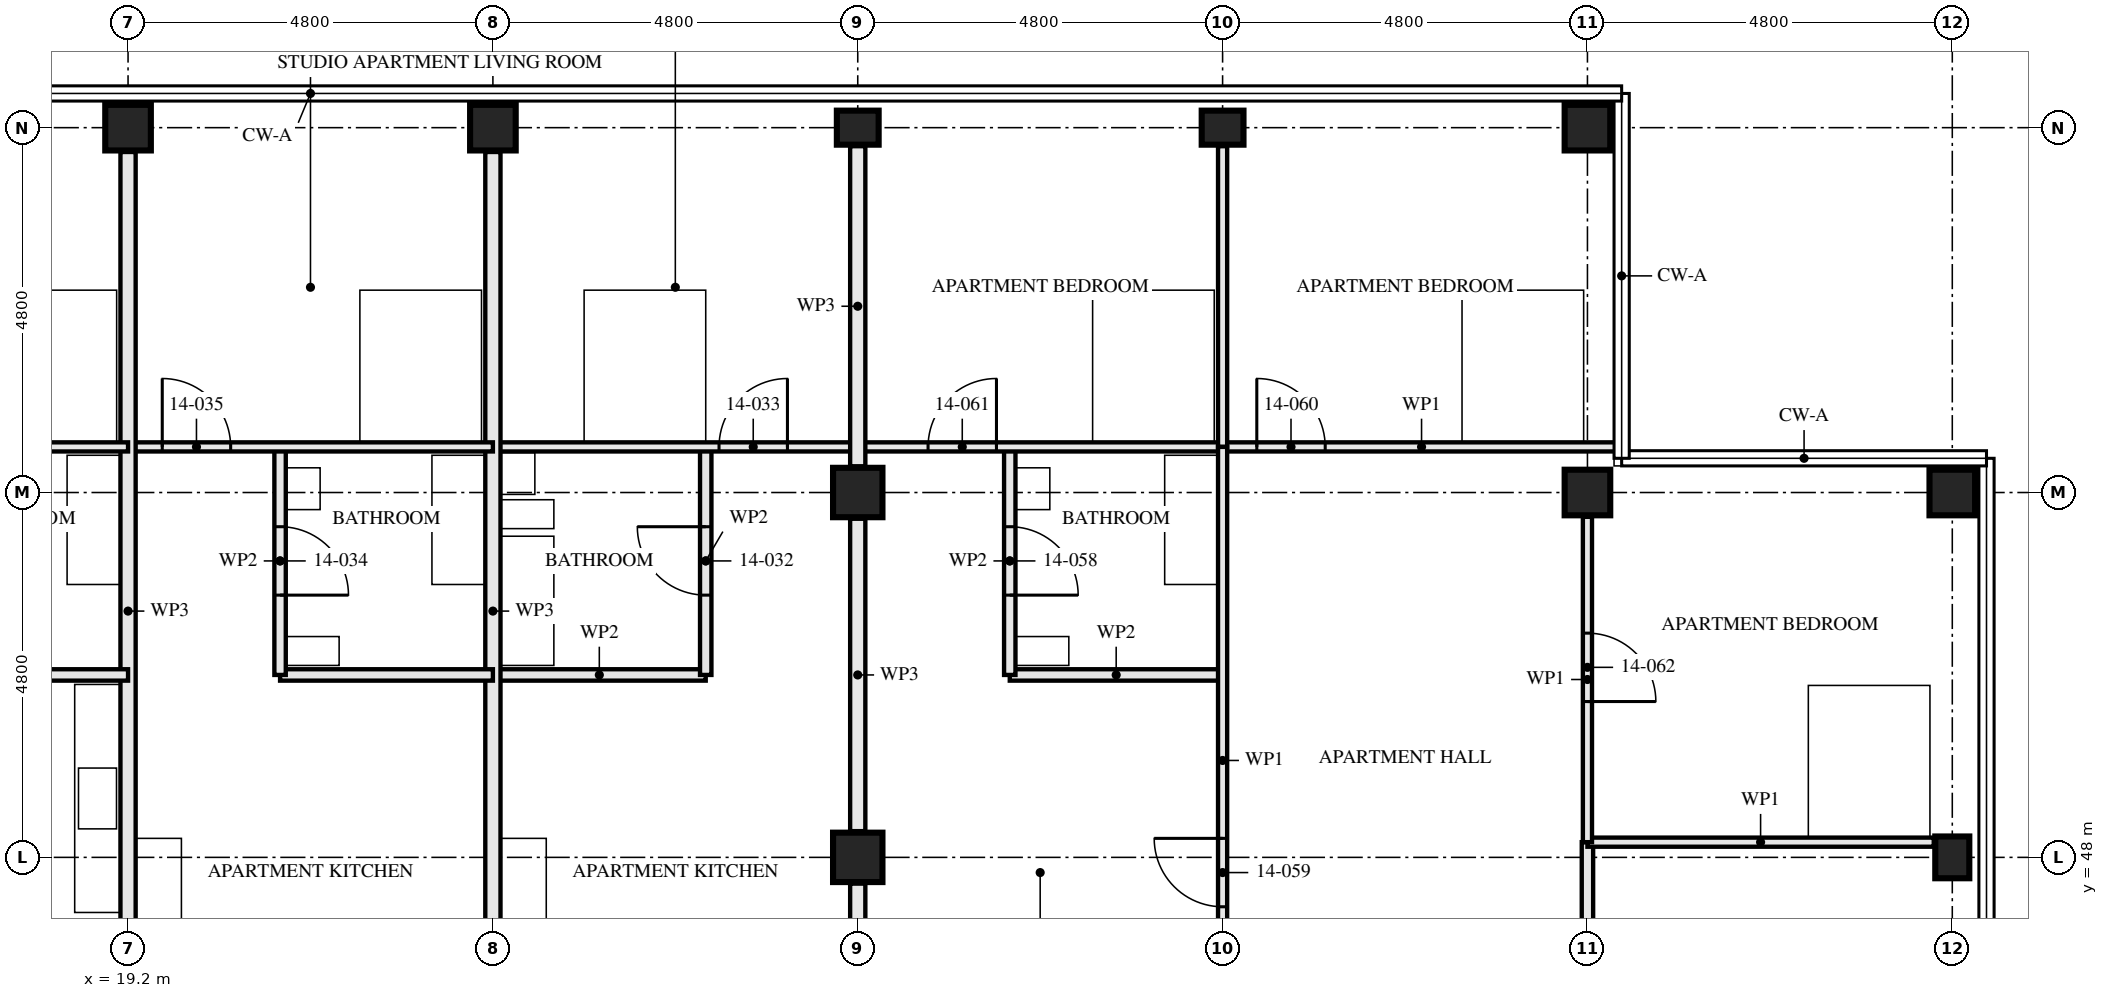
"""IFC4 building model, lengths in metres.
Left out: names, types, materials, properties, quantities, classifications, styles, units other than length and angle.
Written with IfcOpenShell. Run it as: python <this file> out.ifc"""

import sys

from ifc_helpers import new_model, si_unit, direction, frame, frame_2d, origin, origin_2d, place, context, subcontext, project, spatial, rectangle, hollow_rectangle, i_section, extrude, element, fill, save


model = new_model("IFC4")
c1 = context("Model", 3, precision=1e-05, world=origin(), true_north=direction((0.0, 1.0)))
c2 = subcontext(c1, "Body", "Model", "MODEL_VIEW")
j1 = project(units=[si_unit("LENGTHUNIT", "METRE"), si_unit("PLANEANGLEUNIT", "RADIAN")], contexts=[c1])
p1 = place(None, origin())
s1 = spatial("IfcSite", under=j1, at=p1, CompositionType="ELEMENT")
p2 = place(p1, origin())
s2 = spatial("IfcBuilding", under=s1, at=p2, CompositionType="ELEMENT")
p3 = place(p2, frame((0.0, 0.0, 55.0)))
s3 = spatial("IfcBuildingStorey", under=s2, at=p3, CompositionType="ELEMENT", Elevation=55.0)
for number, where, z_axis, x_axis in (
    (1, (19.2, 57.6, 0.0), (0.0, 0.0, 1.0), (0.0, 1.0, 0.0)),
    (2, (24.0, 57.6, 0.0), (0.0, 0.0, 1.0), (0.0, 1.0, 0.0)),
):
    element("IfcColumn", number, at=place(p3, frame(where, z_axis=z_axis, x_axis=x_axis)), inside=s3, PredefinedType="COLUMN", context=c2, shape_type="SweptSolid", body=[
        extrude(hollow_rectangle(XDim=0.6, YDim=0.6, WallThickness=0.08, at=origin_2d()), origin(), (0.0, 0.0, 1.0), 3.5),
    ])
for number, where, z_axis, x_axis in (
    (3, (28.8, 48.0, 0.0), (0.0, 0.0, 1.0), (1.0, 0.0, 0.0)),
    (4, (28.8, 52.8, 0.0), (0.0, 0.0, 1.0), (1.0, 0.0, 0.0)),
):
    element("IfcColumn", number, at=place(p3, frame(where, z_axis=z_axis, x_axis=x_axis)), inside=s3, PredefinedType="COLUMN", context=c2, shape_type="SweptSolid", body=[
        extrude(hollow_rectangle(XDim=0.65, YDim=0.65, WallThickness=0.05, at=origin_2d()), origin(), (0.0, 0.0, 1.0), 3.5),
    ])
for number, where, z_axis, x_axis in (
    (5, (28.8, 57.6, 0.0), (0.0, 0.0, 1.0), (0.0, 1.0, 0.0)),
    (6, (33.6, 57.6, 0.0), (0.0, 0.0, 1.0), (0.0, 1.0, 0.0)),
):
    element("IfcColumn", number, at=place(p3, frame(where, z_axis=z_axis, x_axis=x_axis)), inside=s3, PredefinedType="COLUMN", context=c2, shape_type="SweptSolid", body=[
        extrude(i_section(OverallWidth=0.448, OverallDepth=0.55, WebThickness=0.072, FlangeThickness=0.115, FilletRadius=0.015, at=origin_2d()), origin(), (0.0, 0.0, 1.0), 3.5),
    ])
for number, where, z_axis, x_axis in (
    (7, (38.4, 52.8, 0.0), (0.0, 0.0, 1.0), (0.0, 1.0, 0.0)),
    (8, (38.4, 57.6, 0.0), (0.0, 0.0, 1.0), (0.0, 1.0, 0.0)),
):
    element("IfcColumn", number, at=place(p3, frame(where, z_axis=z_axis, x_axis=x_axis)), inside=s3, PredefinedType="COLUMN", context=c2, shape_type="SweptSolid", body=[
        extrude(hollow_rectangle(XDim=0.6, YDim=0.6, WallThickness=0.05, at=origin_2d()), origin(), (0.0, 0.0, 1.0), 3.5),
    ])
p4 = place(p3, frame((43.2, 48.0, 0.0), z_axis=(0.0, 0.0, 1.0), x_axis=(1.0, 0.0, 0.0)))
e9 = element("IfcColumn", 9, at=p4, inside=s3, PredefinedType="COLUMN", context=c2, shape_type="SweptSolid", body=[
    extrude(i_section(OverallWidth=0.448, OverallDepth=0.55, WebThickness=0.072, FlangeThickness=0.115, FilletRadius=0.015, at=origin_2d()), origin(), (0.0, 0.0, 1.0), 3.5),
])
p5 = place(p3, frame((43.2, 52.8, 0.0), z_axis=(0.0, 0.0, 1.0), x_axis=(0.0, 1.0, 0.0)))
e10 = element("IfcColumn", 10, at=p5, inside=s3, PredefinedType="COLUMN", context=c2, shape_type="SweptSolid", body=[
    extrude(hollow_rectangle(XDim=0.6, YDim=0.6, WallThickness=0.05, at=origin_2d()), origin(), (0.0, 0.0, 1.0), 3.5),
])
p6 = place(p3, frame((26.8, 53.4, 0.0), z_axis=(0.0, 0.0, 1.0), x_axis=(0.0, -1.0, 0.0)))
e11 = element("IfcWall", 11, at=p6, inside=s3, PredefinedType="PARTITIONING", context=c2, shape_type="SweptSolid", body=[
    extrude(rectangle(XDim=3.0, YDim=0.15, at=frame_2d((1.5, 0.0))), origin(), (0.0, 0.0, 1.0), 2.55),
])
p7 = place(p6, frame((1.05, 0.0, 0.0)))
e12 = element("IfcOpeningElement", 12, at=p7, cuts=e11, PredefinedType="OPENING", context=c2, shape_type="SweptSolid", body=[
    extrude(rectangle(XDim=0.9, YDim=2.1, at=frame_2d((0.45, 1.05))), frame((0.0, 0.085, 0.0), z_axis=(0.0, -1.0, 0.0), x_axis=(1.0, 0.0, 0.0)), (0.0, 0.0, 1.0), 0.171),
])
p8 = place(p3, frame((26.8, 50.4, 0.0), z_axis=(0.0, 0.0, 1.0), x_axis=(-1.0, 0.0, 0.0)))
e13 = element("IfcWall", 13, at=p8, inside=s3, PredefinedType="PARTITIONING", context=c2, shape_type="SweptSolid", body=[
    extrude(rectangle(XDim=2.8, YDim=0.15, at=frame_2d((1.4, 0.0))), origin(), (0.0, 0.0, 1.0), 3.33),
])
p9 = place(p3, frame((28.8, 53.4, 0.0), z_axis=(0.0, 0.0, 1.0), x_axis=(-1.0, 0.0, 0.0)))
e14 = element("IfcWall", 14, at=p9, inside=s3, PredefinedType="PARTITIONING", context=c2, shape_type="SweptSolid", body=[
    extrude(rectangle(XDim=4.8, YDim=0.12, at=frame_2d((2.4, 0.0))), origin(), (0.0, 0.0, 1.0), 3.33),
])
p10 = place(p9, frame((0.925, 0.0, 0.0)))
e15 = element("IfcOpeningElement", 15, at=p10, cuts=e14, PredefinedType="OPENING", context=c2, shape_type="SweptSolid", body=[
    extrude(rectangle(XDim=0.9, YDim=2.1, at=frame_2d((0.45, 1.05))), frame((0.0, 0.071, 0.0), z_axis=(0.0, -1.0, 0.0), x_axis=(1.0, 0.0, 0.0)), (0.0, 0.0, 1.0), 0.141),
])
p11 = place(p3, frame((24.0, 57.28, 0.0), z_axis=(0.0, 0.0, 1.0), x_axis=(0.0, -1.0, 0.0)))
e16 = element("IfcWall", 16, at=p11, inside=s3, PredefinedType="PARTITIONING", context=c2, shape_type="SweptSolid", body=[
    extrude(rectangle(XDim=12.08, YDim=0.2, at=frame_2d((6.04, 0.0))), origin(), (0.0, 0.0, 1.0), 2.55),
])
p12 = place(p3, frame((21.2, 53.4, 0.0), z_axis=(0.0, 0.0, 1.0), x_axis=(0.0, -1.0, 0.0)))
e17 = element("IfcWall", 17, at=p12, inside=s3, PredefinedType="PARTITIONING", context=c2, shape_type="SweptSolid", body=[
    extrude(rectangle(XDim=3.0, YDim=0.15, at=frame_2d((1.5, 0.0))), origin(), (0.0, 0.0, 1.0), 2.55),
])
p13 = place(p12, frame((1.05, 0.0, 0.0)))
e18 = element("IfcOpeningElement", 18, at=p13, cuts=e17, PredefinedType="OPENING", context=c2, shape_type="SweptSolid", body=[
    extrude(rectangle(XDim=0.9, YDim=2.1, at=frame_2d((0.45, 1.05))), frame((0.0, 0.085, 0.0), z_axis=(0.0, -1.0, 0.0), x_axis=(1.0, 0.0, 0.0)), (0.0, 0.0, 1.0), 0.171),
])
p14 = place(p3, frame((24.0, 50.4, 0.0), z_axis=(0.0, 0.0, 1.0), x_axis=(-1.0, 0.0, 0.0)))
e19 = element("IfcWall", 19, at=p14, inside=s3, PredefinedType="PARTITIONING", context=c2, shape_type="SweptSolid", body=[
    extrude(rectangle(XDim=2.8, YDim=0.15, at=frame_2d((1.4, 0.0))), origin(), (0.0, 0.0, 1.0), 3.33),
])
p15 = place(p3, frame((24.0, 53.4, 0.0), z_axis=(0.0, 0.0, 1.0), x_axis=(-1.0, 0.0, 0.0)))
e20 = element("IfcWall", 20, at=p15, inside=s3, PredefinedType="PARTITIONING", context=c2, shape_type="SweptSolid", body=[
    extrude(rectangle(XDim=4.8, YDim=0.12, at=frame_2d((2.4, 0.0))), origin(), (0.0, 0.0, 1.0), 3.33),
])
p16 = place(p15, frame((3.45, 0.0, 0.0)))
e21 = element("IfcOpeningElement", 21, at=p16, cuts=e20, PredefinedType="OPENING", context=c2, shape_type="SweptSolid", body=[
    extrude(rectangle(XDim=0.9, YDim=2.1, at=frame_2d((0.45, 1.05))), frame((0.0, 0.071, 0.0), z_axis=(0.0, -1.0, 0.0), x_axis=(1.0, 0.0, 0.0)), (0.0, 0.0, 1.0), 0.141),
])
p17 = place(p3, frame((19.2, 57.28, 0.0), z_axis=(0.0, 0.0, 1.0), x_axis=(0.0, -1.0, 0.0)))
e22 = element("IfcWall", 22, at=p17, inside=s3, PredefinedType="PARTITIONING", context=c2, shape_type="SweptSolid", body=[
    extrude(rectangle(XDim=12.08, YDim=0.2, at=frame_2d((6.04, 0.0))), origin(), (0.0, 0.0, 1.0), 2.55),
])
p18 = place(p3, frame((19.2, 50.4, 0.0), z_axis=(0.0, 0.0, 1.0), x_axis=(-1.0, 0.0, 0.0)))
e23 = element("IfcWall", 23, at=p18, inside=s3, PredefinedType="PARTITIONING", context=c2, shape_type="SweptSolid", body=[
    extrude(rectangle(XDim=2.8, YDim=0.15, at=frame_2d((1.4, 0.0))), origin(), (0.0, 0.0, 1.0), 3.33),
])
p19 = place(p3, frame((19.2, 53.4, 0.0), z_axis=(0.0, 0.0, 1.0), x_axis=(-1.0, 0.0, 0.0)))
e24 = element("IfcWall", 24, at=p19, inside=s3, PredefinedType="PARTITIONING", context=c2, shape_type="SweptSolid", body=[
    extrude(rectangle(XDim=4.8, YDim=0.12, at=frame_2d((2.4, 0.0))), origin(), (0.0, 0.0, 1.0), 3.33),
])
p20 = place(p19, frame((2.975, 0.0, 0.0)))
e25 = element("IfcOpeningElement", 25, at=p20, cuts=e24, PredefinedType="OPENING", context=c2, shape_type="SweptSolid", body=[
    extrude(rectangle(XDim=0.9, YDim=2.1, at=frame_2d((0.45, 1.05))), frame((0.0, 0.071, 0.0), z_axis=(0.0, -1.0, 0.0), x_axis=(1.0, 0.0, 0.0)), (0.0, 0.0, 1.0), 0.141),
])
p21 = place(p3, frame((38.4, 48.2, 0.0), z_axis=(0.0, 0.0, 1.0), x_axis=(0.0, -1.0, 0.0)))
e26 = element("IfcWall", 26, at=p21, inside=s3, PredefinedType="PARTITIONING", context=c2, shape_type="SweptSolid", body=[
    extrude(rectangle(XDim=3.0, YDim=0.15, at=frame_2d((1.5, 0.0))), origin(), (0.0, 0.0, 1.0), 2.55),
])
p22 = place(p21, frame((1.05, 0.0, 0.0)))
e27 = element("IfcOpeningElement", 27, at=p22, cuts=e26, PredefinedType="OPENING", context=c2, shape_type="SweptSolid", body=[
    extrude(rectangle(XDim=0.9, YDim=2.1, at=frame_2d((0.45, 1.05))), frame((0.0, 0.085, 0.0), z_axis=(0.0, -1.0, 0.0), x_axis=(1.0, 0.0, 0.0)), (0.0, 0.0, 1.0), 0.171),
])
p23 = place(p3, frame((30.8, 53.4, 0.0), z_axis=(0.0, 0.0, 1.0), x_axis=(0.0, -1.0, 0.0)))
e28 = element("IfcWall", 28, at=p23, inside=s3, PredefinedType="PARTITIONING", context=c2, shape_type="SweptSolid", body=[
    extrude(rectangle(XDim=3.0, YDim=0.15, at=frame_2d((1.5, 0.0))), origin(), (0.0, 0.0, 1.0), 2.55),
])
p24 = place(p23, frame((1.05, 0.0, 0.0)))
e29 = element("IfcOpeningElement", 29, at=p24, cuts=e28, PredefinedType="OPENING", context=c2, shape_type="SweptSolid", body=[
    extrude(rectangle(XDim=0.9, YDim=2.1, at=frame_2d((0.45, 1.05))), frame((0.0, 0.085, 0.0), z_axis=(0.0, -1.0, 0.0), x_axis=(1.0, 0.0, 0.0)), (0.0, 0.0, 1.0), 0.171),
])
p25 = place(p3, frame((33.6, 50.4, 0.0), z_axis=(0.0, 0.0, 1.0), x_axis=(-1.0, 0.0, 0.0)))
e30 = element("IfcWall", 30, at=p25, inside=s3, PredefinedType="PARTITIONING", context=c2, shape_type="SweptSolid", body=[
    extrude(rectangle(XDim=2.8, YDim=0.15, at=frame_2d((1.4, 0.0))), origin(), (0.0, 0.0, 1.0), 3.33),
])
p26 = place(p3, frame((33.6, 53.4, 0.0), z_axis=(0.0, 0.0, 1.0), x_axis=(0.0, -1.0, 0.0)))
e31 = element("IfcWall", 31, at=p26, inside=s3, PredefinedType="PARTITIONING", context=c2, shape_type="SweptSolid", body=[
    extrude(rectangle(XDim=8.25, YDim=0.12, at=frame_2d((4.125, 0.0))), origin(), (0.0, 0.0, 1.0), 2.55),
])
p27 = place(p26, frame((5.15, 0.0, 0.0)))
e32 = element("IfcOpeningElement", 32, at=p27, cuts=e31, PredefinedType="OPENING", context=c2, shape_type="SweptSolid", body=[
    extrude(rectangle(XDim=0.9, YDim=2.1, at=frame_2d((0.45, 1.05))), frame((0.0, 0.071, 0.0), z_axis=(0.0, -1.0, 0.0), x_axis=(1.0, 0.0, 0.0)), (0.0, 0.0, 1.0), 0.141),
])
p28 = place(p3, frame((42.956, 48.2, 0.0), z_axis=(0.0, 0.0, 1.0), x_axis=(-1.0, 0.0, 0.0)))
e33 = element("IfcWall", 33, at=p28, inside=s3, PredefinedType="PARTITIONING", context=c2, shape_type="SweptSolid", body=[
    extrude(rectangle(XDim=4.556, YDim=0.12, at=frame_2d((2.278, 0.0))), origin(), (0.0, 0.0, 1.0), 3.33),
])
p29 = place(p3, frame((38.835, 53.4, 0.0), z_axis=(0.0, 0.0, 1.0), x_axis=(-1.0, 0.0, 0.0)))
e34 = element("IfcWall", 34, at=p29, inside=s3, PredefinedType="PARTITIONING", context=c2, shape_type="SweptSolid", body=[
    extrude(rectangle(XDim=5.235, YDim=0.12, at=frame_2d((2.617, 0.0))), origin(), (0.0, 0.0, 1.0), 2.32),
])
p30 = place(p29, frame((3.885, 0.0, 0.0)))
e35 = element("IfcOpeningElement", 35, at=p30, cuts=e34, PredefinedType="OPENING", context=c2, shape_type="SweptSolid", body=[
    extrude(rectangle(XDim=0.9, YDim=2.1, at=frame_2d((0.45, 1.05))), frame((0.0, 0.071, 0.0), z_axis=(0.0, -1.0, 0.0), x_axis=(1.0, 0.0, 0.0)), (0.0, 0.0, 1.0), 0.141),
])
p31 = place(p3, frame((33.6, 53.4, 0.0), z_axis=(0.0, 0.0, 1.0), x_axis=(-1.0, 0.0, 0.0)))
e36 = element("IfcWall", 36, at=p31, inside=s3, PredefinedType="PARTITIONING", context=c2, shape_type="SweptSolid", body=[
    extrude(rectangle(XDim=4.8, YDim=0.12, at=frame_2d((2.4, 0.0))), origin(), (0.0, 0.0, 1.0), 3.33),
])
p32 = place(p31, frame((2.975, 0.0, 0.0)))
e37 = element("IfcOpeningElement", 37, at=p32, cuts=e36, PredefinedType="OPENING", context=c2, shape_type="SweptSolid", body=[
    extrude(rectangle(XDim=0.9, YDim=2.1, at=frame_2d((0.45, 1.05))), frame((0.0, 0.071, 0.0), z_axis=(0.0, -1.0, 0.0), x_axis=(1.0, 0.0, 0.0)), (0.0, 0.0, 1.0), 0.141),
])
p33 = place(p3, frame((38.4, 52.48, 0.0), z_axis=(0.0, 0.0, 1.0), x_axis=(0.0, -1.0, 0.0)))
e38 = element("IfcWall", 38, at=p33, inside=s3, PredefinedType="PARTITIONING", context=c2, shape_type="SweptSolid", body=[
    extrude(rectangle(XDim=4.28, YDim=0.12, at=frame_2d((2.14, 0.0))), origin(), (0.0, 0.0, 1.0), 3.33),
])
p34 = place(p33, frame((1.53, 0.0, 0.0)))
e39 = element("IfcOpeningElement", 39, at=p34, cuts=e38, PredefinedType="OPENING", context=c2, shape_type="SweptSolid", body=[
    extrude(rectangle(XDim=0.9, YDim=2.1, at=frame_2d((0.45, 1.05))), frame((0.0, 0.071, 0.0), z_axis=(0.0, -1.0, 0.0), x_axis=(1.0, 0.0, 0.0)), (0.0, 0.0, 1.0), 0.141),
])
p35 = place(p3, frame((33.6, 57.356, 0.0), z_axis=(0.0, 0.0, 1.0), x_axis=(0.0, -1.0, 0.0)))
e40 = element("IfcWall", 40, at=p35, inside=s3, PredefinedType="PARTITIONING", context=c2, shape_type="SweptSolid", body=[
    extrude(rectangle(XDim=3.956, YDim=0.12, at=frame_2d((1.978, 0.0))), origin(), (0.0, 0.0, 1.0), 3.33),
])
p36 = place(p3, frame((28.8, 45.1, 0.0), z_axis=(0.0, 0.0, 1.0), x_axis=(0.0, 1.0, 0.0)))
e41 = element("IfcWall", 41, at=p36, inside=s3, PredefinedType="PARTITIONING", context=c2, shape_type="SweptSolid", body=[
    extrude(rectangle(XDim=2.555, YDim=0.2, at=frame_2d((1.277, 0.0))), origin(), (0.0, 0.0, 1.0), 2.32),
])
p37 = place(p3, frame((28.8, 48.345, 0.0), z_axis=(0.0, 0.0, 1.0), x_axis=(0.0, 1.0, 0.0)))
e42 = element("IfcWall", 42, at=p37, inside=s3, PredefinedType="PARTITIONING", context=c2, shape_type="SweptSolid", body=[
    extrude(rectangle(XDim=4.11, YDim=0.2, at=frame_2d((2.055, 0.0))), origin(), (0.0, 0.0, 1.0), 2.32),
])
p38 = place(p3, frame((28.8, 53.145, 0.0), z_axis=(0.0, 0.0, 1.0), x_axis=(0.0, 1.0, 0.0)))
e43 = element("IfcWall", 43, at=p38, inside=s3, PredefinedType="PARTITIONING", context=c2, shape_type="SweptSolid", body=[
    extrude(rectangle(XDim=4.211, YDim=0.2, at=frame_2d((2.105, 0.0))), origin(), (0.0, 0.0, 1.0), 2.32),
])
p39 = place(p7, frame((0.9, 0.0, 0.0), z_axis=(0.0, 0.0, 1.0), x_axis=(-1.0, 0.0, 0.0)))
e44 = element("IfcDoor", 44, at=p39, inside=s3, OperationType="SINGLE_SWING_LEFT", PredefinedType="DOOR", context=c2, shape_type="SweptSolid", body=[
    extrude(rectangle(XDim=0.9, YDim=2.1, at=frame_2d((0.45, 1.05))), frame((0.0, 0.022, 0.0), z_axis=(0.0, -1.0, 0.0), x_axis=(1.0, 0.0, 0.0)), (0.0, 0.0, 1.0), 0.044),
])
fill(e12, e44)
p40 = place(p10, frame((0.9, 0.0, 0.0), z_axis=(0.0, 0.0, 1.0), x_axis=(-1.0, 0.0, 0.0)))
e45 = element("IfcDoor", 45, at=p40, inside=s3, OperationType="SINGLE_SWING_LEFT", PredefinedType="DOOR", context=c2, shape_type="SweptSolid", body=[
    extrude(rectangle(XDim=0.9, YDim=2.1, at=frame_2d((0.45, 1.05))), frame((0.0, 0.022, 0.0), z_axis=(0.0, -1.0, 0.0), x_axis=(1.0, 0.0, 0.0)), (0.0, 0.0, 1.0), 0.044),
])
fill(e15, e45)
p41 = place(p13, origin())
e46 = element("IfcDoor", 46, at=p41, inside=s3, OperationType="SINGLE_SWING_LEFT", PredefinedType="DOOR", context=c2, shape_type="SweptSolid", body=[
    extrude(rectangle(XDim=0.9, YDim=2.1, at=frame_2d((0.45, 1.05))), frame((0.0, 0.022, 0.0), z_axis=(0.0, -1.0, 0.0), x_axis=(1.0, 0.0, 0.0)), (0.0, 0.0, 1.0), 0.044),
])
fill(e18, e46)
p42 = place(p16, frame((0.9, 0.0, 0.0), z_axis=(0.0, 0.0, 1.0), x_axis=(-1.0, 0.0, 0.0)))
e47 = element("IfcDoor", 47, at=p42, inside=s3, OperationType="SINGLE_SWING_RIGHT", PredefinedType="DOOR", context=c2, shape_type="SweptSolid", body=[
    extrude(rectangle(XDim=0.9, YDim=2.1, at=frame_2d((0.45, 1.05))), frame((0.0, 0.022, 0.0), z_axis=(0.0, -1.0, 0.0), x_axis=(1.0, 0.0, 0.0)), (0.0, 0.0, 1.0), 0.044),
])
fill(e21, e47)
p43 = place(p24, origin())
e48 = element("IfcDoor", 48, at=p43, inside=s3, OperationType="SINGLE_SWING_LEFT", PredefinedType="DOOR", context=c2, shape_type="SweptSolid", body=[
    extrude(rectangle(XDim=0.9, YDim=2.1, at=frame_2d((0.45, 1.05))), frame((0.0, 0.022, 0.0), z_axis=(0.0, -1.0, 0.0), x_axis=(1.0, 0.0, 0.0)), (0.0, 0.0, 1.0), 0.044),
])
fill(e29, e48)
p44 = place(p27, frame((0.9, 0.0, 0.0), z_axis=(0.0, 0.0, 1.0), x_axis=(-1.0, 0.0, 0.0)))
e49 = element("IfcDoor", 49, at=p44, inside=s3, OperationType="SINGLE_SWING_LEFT", PredefinedType="DOOR", context=c2, shape_type="SweptSolid", body=[
    extrude(rectangle(XDim=0.9, YDim=2.1, at=frame_2d((0.45, 1.05))), frame((0.0, 0.022, 0.0), z_axis=(0.0, -1.0, 0.0), x_axis=(1.0, 0.0, 0.0)), (0.0, 0.0, 1.0), 0.044),
])
fill(e32, e49)
p45 = place(p30, frame((0.9, 0.0, 0.0), z_axis=(0.0, 0.0, 1.0), x_axis=(-1.0, 0.0, 0.0)))
e50 = element("IfcDoor", 50, at=p45, inside=s3, OperationType="SINGLE_SWING_RIGHT", PredefinedType="DOOR", context=c2, shape_type="SweptSolid", body=[
    extrude(rectangle(XDim=0.9, YDim=2.1, at=frame_2d((0.45, 1.05))), frame((0.0, 0.022, 0.0), z_axis=(0.0, -1.0, 0.0), x_axis=(1.0, 0.0, 0.0)), (0.0, 0.0, 1.0), 0.044),
])
fill(e35, e50)
p46 = place(p32, frame((0.9, 0.0, 0.0), z_axis=(0.0, 0.0, 1.0), x_axis=(-1.0, 0.0, 0.0)))
e51 = element("IfcDoor", 51, at=p46, inside=s3, OperationType="SINGLE_SWING_LEFT", PredefinedType="DOOR", context=c2, shape_type="SweptSolid", body=[
    extrude(rectangle(XDim=0.9, YDim=2.1, at=frame_2d((0.45, 1.05))), frame((0.0, 0.022, 0.0), z_axis=(0.0, -1.0, 0.0), x_axis=(1.0, 0.0, 0.0)), (0.0, 0.0, 1.0), 0.044),
])
fill(e37, e51)
p47 = place(p34, origin())
e52 = element("IfcDoor", 52, at=p47, inside=s3, OperationType="SINGLE_SWING_LEFT", PredefinedType="DOOR", context=c2, shape_type="SweptSolid", body=[
    extrude(rectangle(XDim=0.9, YDim=2.1, at=frame_2d((0.45, 1.05))), frame((0.0, 0.022, 0.0), z_axis=(0.0, -1.0, 0.0), x_axis=(1.0, 0.0, 0.0)), (0.0, 0.0, 1.0), 0.044),
])
fill(e39, e52)
save(model, sys.argv[1])
